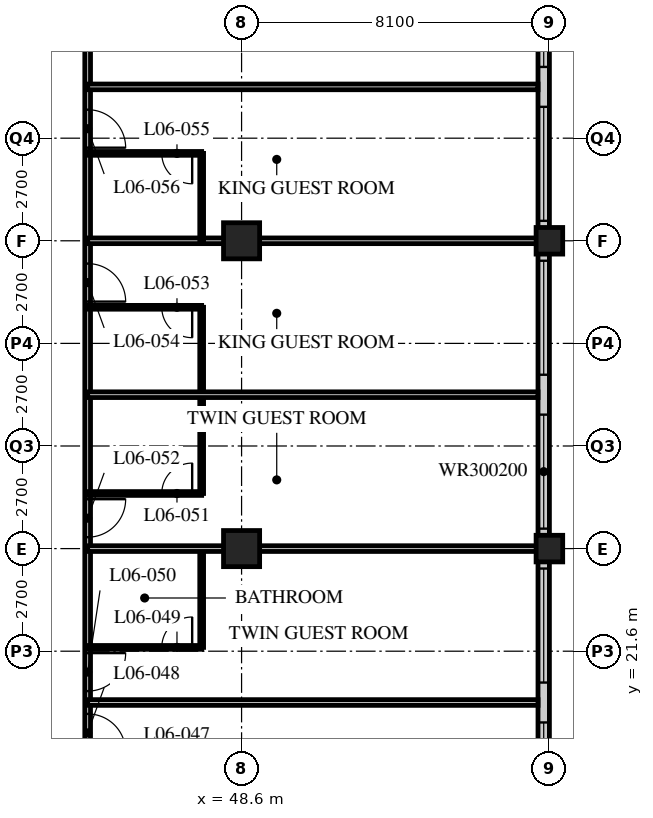
"""IFC4 building model, lengths in metres.
Left out: names, types, materials, properties, quantities, classifications, styles, units other than length and angle.
Written with IfcOpenShell. Run it as: python <this file> out.ifc"""

import sys

from ifc_helpers import new_model, si_unit, direction, frame, frame_2d, origin, origin_2d, place, context, subcontext, project, spatial, rectangle, hollow_rectangle, extrude, element, fill, save


model = new_model("IFC4")
c1 = context("Model", 3, precision=1e-05, world=origin(), true_north=direction((0.0, 1.0)))
c2 = subcontext(c1, "Body", "Model", "MODEL_VIEW")
j1 = project(units=[si_unit("LENGTHUNIT", "METRE"), si_unit("PLANEANGLEUNIT", "RADIAN")], contexts=[c1])
p1 = place(None, origin())
s1 = spatial("IfcSite", under=j1, at=p1, CompositionType="ELEMENT")
p2 = place(p1, origin())
s2 = spatial("IfcBuilding", under=s1, at=p2, CompositionType="ELEMENT")
p3 = place(p2, frame((0.0, 0.0, 33.0)))
s3 = spatial("IfcBuildingStorey", under=s2, at=p3, CompositionType="ELEMENT", Elevation=33.0)
for number, where, z_axis, x_axis in (
    (1, (48.6, 24.3, 0.0), (0.0, 0.0, 1.0), (1.0, 0.0, 0.0)),
    (2, (48.6, 32.4, 0.0), (0.0, 0.0, 1.0), (1.0, 0.0, 0.0)),
):
    element("IfcColumn", number, at=place(p3, frame(where, z_axis=z_axis, x_axis=x_axis)), inside=s3, PredefinedType="COLUMN", context=c2, shape_type="SweptSolid", body=[
        extrude(hollow_rectangle(XDim=0.95, YDim=0.95, WallThickness=0.095, at=origin_2d()), origin(), (0.0, 0.0, 1.0), 3.4),
    ])
for number, where, z_axis, x_axis in (
    (3, (56.7, 24.3, 0.0), (0.0, 0.0, 1.0), (1.0, 0.0, 0.0)),
    (4, (56.7, 32.4, 0.0), (0.0, 0.0, 1.0), (1.0, 0.0, 0.0)),
):
    element("IfcColumn", number, at=place(p3, frame(where, z_axis=z_axis, x_axis=x_axis)), inside=s3, PredefinedType="COLUMN", context=c2, shape_type="SweptSolid", body=[
        extrude(hollow_rectangle(XDim=0.7, YDim=0.7, WallThickness=0.06, at=origin_2d()), origin(), (0.0, 0.0, 1.0), 3.4),
    ])
p4 = place(p3, frame((56.55, 8.4, 0.0), z_axis=(0.0, 0.0, 1.0), x_axis=(0.0, 1.0, 0.0)))
e5 = element("IfcWall", 5, at=p4, inside=s3, PredefinedType="SOLIDWALL", context=c2, shape_type="SweptSolid", body=[
    extrude(rectangle(XDim=32.1, YDim=0.3, at=frame_2d((16.05, 0.0))), origin(), (0.0, 0.0, 1.0), 3.19),
])
p5 = place(p4, frame((0.225, 0.0, 0.9)))
e6 = element("IfcOpeningElement", 6, at=p5, cuts=e5, PredefinedType="OPENING", context=c2, shape_type="SweptSolid", body=[
    extrude(rectangle(XDim=3.0, YDim=2.0, at=frame_2d((1.5, 1.0))), frame((0.0, 0.16, 0.0), z_axis=(0.0, -1.0, 0.0), x_axis=(1.0, 0.0, 0.0)), (0.0, 0.0, 1.0), 0.32),
])
p6 = place(p4, frame((4.275, 0.0, 0.9)))
e7 = element("IfcOpeningElement", 7, at=p6, cuts=e5, PredefinedType="OPENING", context=c2, shape_type="SweptSolid", body=[
    extrude(rectangle(XDim=3.0, YDim=2.0, at=frame_2d((1.5, 1.0))), frame((0.0, 0.16, 0.0), z_axis=(0.0, -1.0, 0.0), x_axis=(1.0, 0.0, 0.0)), (0.0, 0.0, 1.0), 0.32),
])
p7 = place(p4, frame((8.325, 0.0, 0.9)))
e8 = element("IfcOpeningElement", 8, at=p7, cuts=e5, PredefinedType="OPENING", context=c2, shape_type="SweptSolid", body=[
    extrude(rectangle(XDim=3.0, YDim=2.0, at=frame_2d((1.5, 1.0))), frame((0.0, 0.16, 0.0), z_axis=(0.0, -1.0, 0.0), x_axis=(1.0, 0.0, 0.0)), (0.0, 0.0, 1.0), 0.32),
])
p8 = place(p4, frame((12.375, 0.0, 0.9)))
e9 = element("IfcOpeningElement", 9, at=p8, cuts=e5, PredefinedType="OPENING", context=c2, shape_type="SweptSolid", body=[
    extrude(rectangle(XDim=3.0, YDim=2.0, at=frame_2d((1.5, 1.0))), frame((0.0, 0.16, 0.0), z_axis=(0.0, -1.0, 0.0), x_axis=(1.0, 0.0, 0.0)), (0.0, 0.0, 1.0), 0.32),
])
p9 = place(p4, frame((16.425, 0.0, 0.9)))
e10 = element("IfcOpeningElement", 10, at=p9, cuts=e5, PredefinedType="OPENING", context=c2, shape_type="SweptSolid", body=[
    extrude(rectangle(XDim=3.0, YDim=2.0, at=frame_2d((1.5, 1.0))), frame((0.0, 0.16, 0.0), z_axis=(0.0, -1.0, 0.0), x_axis=(1.0, 0.0, 0.0)), (0.0, 0.0, 1.0), 0.32),
])
p10 = place(p4, frame((20.475, 0.0, 0.9)))
e11 = element("IfcOpeningElement", 11, at=p10, cuts=e5, PredefinedType="OPENING", context=c2, shape_type="SweptSolid", body=[
    extrude(rectangle(XDim=3.0, YDim=2.0, at=frame_2d((1.5, 1.0))), frame((0.0, 0.16, 0.0), z_axis=(0.0, -1.0, 0.0), x_axis=(1.0, 0.0, 0.0)), (0.0, 0.0, 1.0), 0.32),
])
p11 = place(p4, frame((24.525, 0.0, 0.9)))
e12 = element("IfcOpeningElement", 12, at=p11, cuts=e5, PredefinedType="OPENING", context=c2, shape_type="SweptSolid", body=[
    extrude(rectangle(XDim=3.0, YDim=2.0, at=frame_2d((1.5, 1.0))), frame((0.0, 0.16, 0.0), z_axis=(0.0, -1.0, 0.0), x_axis=(1.0, 0.0, 0.0)), (0.0, 0.0, 1.0), 0.32),
])
p12 = place(p4, frame((28.575, 0.0, 0.9)))
e13 = element("IfcOpeningElement", 13, at=p12, cuts=e5, PredefinedType="OPENING", context=c2, shape_type="SweptSolid", body=[
    extrude(rectangle(XDim=3.0, YDim=2.0, at=frame_2d((1.5, 1.0))), frame((0.0, 0.16, 0.0), z_axis=(0.0, -1.0, 0.0), x_axis=(1.0, 0.0, 0.0)), (0.0, 0.0, 1.0), 0.32),
])
p13 = place(p3, frame((44.55, 16.2, 0.0), z_axis=(0.0, 0.0, 1.0), x_axis=(0.0, 1.0, 0.0)))
e14 = element("IfcWall", 14, at=p13, inside=s3, PredefinedType="PARTITIONING", context=c2, shape_type="SweptSolid", body=[
    extrude(rectangle(XDim=26.1, YDim=0.15, at=frame_2d((13.05, 0.0))), origin(), (0.0, 0.0, 1.0), 3.19),
])
p14 = place(p13, frame((2.75, 0.0, 0.0)))
e15 = element("IfcOpeningElement", 15, at=p14, cuts=e14, PredefinedType="OPENING", context=c2, shape_type="SweptSolid", body=[
    extrude(rectangle(XDim=1.0, YDim=2.1, at=frame_2d((0.5, 1.05))), frame((0.0, 0.085, 0.0), z_axis=(0.0, -1.0, 0.0), x_axis=(1.0, 0.0, 0.0)), (0.0, 0.0, 1.0), 0.17),
])
p15 = place(p13, frame((4.35, 0.0, 0.0)))
e16 = element("IfcOpeningElement", 16, at=p15, cuts=e14, PredefinedType="OPENING", context=c2, shape_type="SweptSolid", body=[
    extrude(rectangle(XDim=1.0, YDim=2.1, at=frame_2d((0.5, 1.05))), frame((0.0, 0.085, 0.0), z_axis=(0.0, -1.0, 0.0), x_axis=(1.0, 0.0, 0.0)), (0.0, 0.0, 1.0), 0.17),
])
p16 = place(p13, frame((8.4, 0.0, 0.0)))
e17 = element("IfcOpeningElement", 17, at=p16, cuts=e14, PredefinedType="OPENING", context=c2, shape_type="SweptSolid", body=[
    extrude(rectangle(XDim=1.0, YDim=2.1, at=frame_2d((0.5, 1.05))), frame((0.0, 0.085, 0.0), z_axis=(0.0, -1.0, 0.0), x_axis=(1.0, 0.0, 0.0)), (0.0, 0.0, 1.0), 0.17),
])
p17 = place(p13, frame((14.6, 0.0, 0.0)))
e18 = element("IfcOpeningElement", 18, at=p17, cuts=e14, PredefinedType="OPENING", context=c2, shape_type="SweptSolid", body=[
    extrude(rectangle(XDim=1.0, YDim=2.1, at=frame_2d((0.5, 1.05))), frame((0.0, 0.085, 0.0), z_axis=(0.0, -1.0, 0.0), x_axis=(1.0, 0.0, 0.0)), (0.0, 0.0, 1.0), 0.17),
])
p18 = place(p13, frame((18.65, 0.0, 0.0)))
e19 = element("IfcOpeningElement", 19, at=p18, cuts=e14, PredefinedType="OPENING", context=c2, shape_type="SweptSolid", body=[
    extrude(rectangle(XDim=1.0, YDim=2.1, at=frame_2d((0.5, 1.05))), frame((0.0, 0.085, 0.0), z_axis=(0.0, -1.0, 0.0), x_axis=(1.0, 0.0, 0.0)), (0.0, 0.0, 1.0), 0.17),
])
p19 = place(p13, frame((22.65, 0.0, 0.0)))
e20 = element("IfcOpeningElement", 20, at=p19, cuts=e14, PredefinedType="OPENING", context=c2, shape_type="SweptSolid", body=[
    extrude(rectangle(XDim=1.0, YDim=2.1, at=frame_2d((0.5, 1.05))), frame((0.0, 0.085, 0.0), z_axis=(0.0, -1.0, 0.0), x_axis=(1.0, 0.0, 0.0)), (0.0, 0.0, 1.0), 0.17),
])
p20 = place(p3, frame((44.55, 20.25, 0.0), z_axis=(0.0, 0.0, 1.0), x_axis=(1.0, 0.0, 0.0)))
e21 = element("IfcWall", 21, at=p20, inside=s3, PredefinedType="PARTITIONING", context=c2, shape_type="SweptSolid", body=[
    extrude(rectangle(XDim=11.85, YDim=0.15, at=frame_2d((5.925, 0.0))), origin(), (0.0, 0.0, 1.0), 3.19),
])
p21 = place(p3, frame((47.55, 21.7, 0.0), z_axis=(0.0, 0.0, 1.0), x_axis=(0.0, 1.0, 0.0)))
e22 = element("IfcWall", 22, at=p21, inside=s3, PredefinedType="PARTITIONING", context=c2, shape_type="SweptSolid", body=[
    extrude(rectangle(XDim=2.6, YDim=0.1, at=frame_2d((1.3, 0.0))), origin(), (0.0, 0.0, 1.0), 3.19),
])
p22 = place(p3, frame((44.55, 21.7, 0.0), z_axis=(0.0, 0.0, 1.0), x_axis=(1.0, 0.0, 0.0)))
e23 = element("IfcWall", 23, at=p22, inside=s3, PredefinedType="PARTITIONING", context=c2, shape_type="SweptSolid", body=[
    extrude(rectangle(XDim=3.0, YDim=0.1, at=frame_2d((1.5, 0.0))), origin(), (0.0, 0.0, 1.0), 3.19),
])
p23 = place(p22, frame((1.95, 0.0, 0.0)))
e24 = element("IfcOpeningElement", 24, at=p23, cuts=e23, PredefinedType="OPENING", context=c2, shape_type="SweptSolid", body=[
    extrude(rectangle(XDim=0.8, YDim=2.1, at=frame_2d((0.4, 1.05))), frame((0.0, 0.06, 0.0), z_axis=(0.0, -1.0, 0.0), x_axis=(1.0, 0.0, 0.0)), (0.0, 0.0, 1.0), 0.12),
])
p24 = place(p3, frame((44.55, 24.3, 0.0), z_axis=(0.0, 0.0, 1.0), x_axis=(1.0, 0.0, 0.0)))
e25 = element("IfcWall", 25, at=p24, inside=s3, PredefinedType="PARTITIONING", context=c2, shape_type="SweptSolid", body=[
    extrude(rectangle(XDim=11.85, YDim=0.15, at=frame_2d((5.925, 0.0))), origin(), (0.0, 0.0, 1.0), 2.578),
])
p25 = place(p3, frame((47.55, 25.75, 0.0), z_axis=(0.0, 0.0, 1.0), x_axis=(0.0, 1.0, 0.0)))
e26 = element("IfcWall", 26, at=p25, inside=s3, PredefinedType="PARTITIONING", context=c2, shape_type="SweptSolid", body=[
    extrude(rectangle(XDim=4.9, YDim=0.1, at=frame_2d((2.45, 0.0))), origin(), (0.0, 0.0, 1.0), 3.19),
])
p26 = place(p3, frame((44.55, 25.75, 0.0), z_axis=(0.0, 0.0, 1.0), x_axis=(1.0, 0.0, 0.0)))
e27 = element("IfcWall", 27, at=p26, inside=s3, PredefinedType="PARTITIONING", context=c2, shape_type="SweptSolid", body=[
    extrude(rectangle(XDim=3.0, YDim=0.1, at=frame_2d((1.5, 0.0))), origin(), (0.0, 0.0, 1.0), 3.19),
])
p27 = place(p26, frame((1.95, 0.0, 0.0)))
e28 = element("IfcOpeningElement", 28, at=p27, cuts=e27, PredefinedType="OPENING", context=c2, shape_type="SweptSolid", body=[
    extrude(rectangle(XDim=0.8, YDim=2.1, at=frame_2d((0.4, 1.05))), frame((0.0, 0.06, 0.0), z_axis=(0.0, -1.0, 0.0), x_axis=(1.0, 0.0, 0.0)), (0.0, 0.0, 1.0), 0.12),
])
p28 = place(p3, frame((44.55, 28.35, 0.0), z_axis=(0.0, 0.0, 1.0), x_axis=(1.0, 0.0, 0.0)))
e29 = element("IfcWall", 29, at=p28, inside=s3, PredefinedType="PARTITIONING", context=c2, shape_type="SweptSolid", body=[
    extrude(rectangle(XDim=11.85, YDim=0.15, at=frame_2d((5.925, 0.0))), origin(), (0.0, 0.0, 1.0), 3.19),
])
p29 = place(p3, frame((44.55, 30.65, 0.0), z_axis=(0.0, 0.0, 1.0), x_axis=(1.0, 0.0, 0.0)))
e30 = element("IfcWall", 30, at=p29, inside=s3, PredefinedType="PARTITIONING", context=c2, shape_type="SweptSolid", body=[
    extrude(rectangle(XDim=3.0, YDim=0.1, at=frame_2d((1.5, 0.0))), origin(), (0.0, 0.0, 1.0), 3.19),
])
p30 = place(p29, frame((1.95, 0.0, 0.0)))
e31 = element("IfcOpeningElement", 31, at=p30, cuts=e30, PredefinedType="OPENING", context=c2, shape_type="SweptSolid", body=[
    extrude(rectangle(XDim=0.8, YDim=2.1, at=frame_2d((0.4, 1.05))), frame((0.0, 0.06, 0.0), z_axis=(0.0, -1.0, 0.0), x_axis=(1.0, 0.0, 0.0)), (0.0, 0.0, 1.0), 0.12),
])
p31 = place(p3, frame((44.55, 32.4, 0.0), z_axis=(0.0, 0.0, 1.0), x_axis=(1.0, 0.0, 0.0)))
e32 = element("IfcWall", 32, at=p31, inside=s3, PredefinedType="PARTITIONING", context=c2, shape_type="SweptSolid", body=[
    extrude(rectangle(XDim=11.85, YDim=0.15, at=frame_2d((5.925, 0.0))), origin(), (0.0, 0.0, 1.0), 2.578),
])
p32 = place(p3, frame((47.55, 32.4, 0.0), z_axis=(0.0, 0.0, 1.0), x_axis=(0.0, 1.0, 0.0)))
e33 = element("IfcWall", 33, at=p32, inside=s3, PredefinedType="PARTITIONING", context=c2, shape_type="SweptSolid", body=[
    extrude(rectangle(XDim=2.3, YDim=0.1, at=frame_2d((1.15, 0.0))), origin(), (0.0, 0.0, 1.0), 3.19),
])
p33 = place(p3, frame((44.55, 34.7, 0.0), z_axis=(0.0, 0.0, 1.0), x_axis=(1.0, 0.0, 0.0)))
e34 = element("IfcWall", 34, at=p33, inside=s3, PredefinedType="PARTITIONING", context=c2, shape_type="SweptSolid", body=[
    extrude(rectangle(XDim=3.0, YDim=0.1, at=frame_2d((1.5, 0.0))), origin(), (0.0, 0.0, 1.0), 3.19),
])
p34 = place(p33, frame((1.95, 0.0, 0.0)))
e35 = element("IfcOpeningElement", 35, at=p34, cuts=e34, PredefinedType="OPENING", context=c2, shape_type="SweptSolid", body=[
    extrude(rectangle(XDim=0.8, YDim=2.1, at=frame_2d((0.4, 1.05))), frame((0.0, 0.06, 0.0), z_axis=(0.0, -1.0, 0.0), x_axis=(1.0, 0.0, 0.0)), (0.0, 0.0, 1.0), 0.12),
])
p35 = place(p3, frame((44.55, 36.45, 0.0), z_axis=(0.0, 0.0, 1.0), x_axis=(1.0, 0.0, 0.0)))
e36 = element("IfcWall", 36, at=p35, inside=s3, PredefinedType="PARTITIONING", context=c2, shape_type="SweptSolid", body=[
    extrude(rectangle(XDim=11.85, YDim=0.15, at=frame_2d((5.925, 0.0))), origin(), (0.0, 0.0, 1.0), 3.19),
])
p36 = place(p7, origin())
e37 = element("IfcWindow", 37, at=p36, inside=s3, PartitioningType="SINGLE_PANEL", PredefinedType="WINDOW", context=c2, shape_type="SweptSolid", body=[
    extrude(rectangle(XDim=3.0, YDim=2.0, at=frame_2d((1.5, 1.0))), frame((0.0, 0.03, 0.0), z_axis=(0.0, -1.0, 0.0), x_axis=(1.0, 0.0, 0.0)), (0.0, 0.0, 1.0), 0.06),
])
fill(e8, e37)
p37 = place(p8, origin())
e38 = element("IfcWindow", 38, at=p37, inside=s3, PartitioningType="SINGLE_PANEL", PredefinedType="WINDOW", context=c2, shape_type="SweptSolid", body=[
    extrude(rectangle(XDim=3.0, YDim=2.0, at=frame_2d((1.5, 1.0))), frame((0.0, 0.03, 0.0), z_axis=(0.0, -1.0, 0.0), x_axis=(1.0, 0.0, 0.0)), (0.0, 0.0, 1.0), 0.06),
])
fill(e9, e38)
p38 = place(p9, origin())
e39 = element("IfcWindow", 39, at=p38, inside=s3, PartitioningType="SINGLE_PANEL", PredefinedType="WINDOW", context=c2, shape_type="SweptSolid", body=[
    extrude(rectangle(XDim=3.0, YDim=2.0, at=frame_2d((1.5, 1.0))), frame((0.0, 0.03, 0.0), z_axis=(0.0, -1.0, 0.0), x_axis=(1.0, 0.0, 0.0)), (0.0, 0.0, 1.0), 0.06),
])
fill(e10, e39)
p39 = place(p10, origin())
e40 = element("IfcWindow", 40, at=p39, inside=s3, PartitioningType="SINGLE_PANEL", PredefinedType="WINDOW", context=c2, shape_type="SweptSolid", body=[
    extrude(rectangle(XDim=3.0, YDim=2.0, at=frame_2d((1.5, 1.0))), frame((0.0, 0.03, 0.0), z_axis=(0.0, -1.0, 0.0), x_axis=(1.0, 0.0, 0.0)), (0.0, 0.0, 1.0), 0.06),
])
fill(e11, e40)
p40 = place(p11, origin())
e41 = element("IfcWindow", 41, at=p40, inside=s3, PartitioningType="SINGLE_PANEL", PredefinedType="WINDOW", context=c2, shape_type="SweptSolid", body=[
    extrude(rectangle(XDim=3.0, YDim=2.0, at=frame_2d((1.5, 1.0))), frame((0.0, 0.03, 0.0), z_axis=(0.0, -1.0, 0.0), x_axis=(1.0, 0.0, 0.0)), (0.0, 0.0, 1.0), 0.06),
])
fill(e12, e41)
p41 = place(p12, origin())
e42 = element("IfcWindow", 42, at=p41, inside=s3, PartitioningType="SINGLE_PANEL", PredefinedType="WINDOW", context=c2, shape_type="SweptSolid", body=[
    extrude(rectangle(XDim=3.0, YDim=2.0, at=frame_2d((1.5, 1.0))), frame((0.0, 0.03, 0.0), z_axis=(0.0, -1.0, 0.0), x_axis=(1.0, 0.0, 0.0)), (0.0, 0.0, 1.0), 0.06),
])
fill(e13, e42)
p42 = place(p14, origin())
e43 = element("IfcDoor", 43, at=p42, inside=s3, OperationType="SINGLE_SWING_RIGHT", PredefinedType="DOOR", context=c2, shape_type="SweptSolid", body=[
    extrude(rectangle(XDim=1.0, YDim=2.1, at=frame_2d((0.5, 1.05))), frame((0.0, 0.025, 0.0), z_axis=(0.0, -1.0, 0.0), x_axis=(1.0, 0.0, 0.0)), (0.0, 0.0, 1.0), 0.05),
])
fill(e15, e43)
p43 = place(p23, origin())
e44 = element("IfcDoor", 44, at=p43, inside=s3, OperationType="SINGLE_SWING_RIGHT", PredefinedType="DOOR", context=c2, shape_type="SweptSolid", body=[
    extrude(rectangle(XDim=0.8, YDim=2.1, at=frame_2d((0.4, 1.05))), frame((0.0, 0.025, 0.0), z_axis=(0.0, -1.0, 0.0), x_axis=(1.0, 0.0, 0.0)), (0.0, 0.0, 1.0), 0.05),
])
fill(e24, e44)
p44 = place(p15, origin())
e45 = element("IfcDoor", 45, at=p44, inside=s3, OperationType="SINGLE_SWING_LEFT", PredefinedType="DOOR", context=c2, shape_type="SweptSolid", body=[
    extrude(rectangle(XDim=1.0, YDim=2.1, at=frame_2d((0.5, 1.05))), frame((0.0, 0.025, 0.0), z_axis=(0.0, -1.0, 0.0), x_axis=(1.0, 0.0, 0.0)), (0.0, 0.0, 1.0), 0.05),
])
fill(e16, e45)
p45 = place(p27, origin())
e46 = element("IfcDoor", 46, at=p45, inside=s3, OperationType="SINGLE_SWING_RIGHT", PredefinedType="DOOR", context=c2, shape_type="SweptSolid", body=[
    extrude(rectangle(XDim=0.8, YDim=2.1, at=frame_2d((0.4, 1.05))), frame((0.0, 0.025, 0.0), z_axis=(0.0, -1.0, 0.0), x_axis=(1.0, 0.0, 0.0)), (0.0, 0.0, 1.0), 0.05),
])
fill(e28, e46)
p46 = place(p16, origin())
e47 = element("IfcDoor", 47, at=p46, inside=s3, OperationType="SINGLE_SWING_LEFT", PredefinedType="DOOR", context=c2, shape_type="SweptSolid", body=[
    extrude(rectangle(XDim=1.0, YDim=2.1, at=frame_2d((0.5, 1.05))), frame((0.0, 0.025, 0.0), z_axis=(0.0, -1.0, 0.0), x_axis=(1.0, 0.0, 0.0)), (0.0, 0.0, 1.0), 0.05),
])
fill(e17, e47)
p47 = place(p30, origin())
e48 = element("IfcDoor", 48, at=p47, inside=s3, OperationType="SINGLE_SWING_LEFT", PredefinedType="DOOR", context=c2, shape_type="SweptSolid", body=[
    extrude(rectangle(XDim=0.8, YDim=2.1, at=frame_2d((0.4, 1.05))), frame((0.0, 0.025, 0.0), z_axis=(0.0, -1.0, 0.0), x_axis=(1.0, 0.0, 0.0)), (0.0, 0.0, 1.0), 0.05),
])
fill(e31, e48)
p48 = place(p17, origin())
e49 = element("IfcDoor", 49, at=p48, inside=s3, OperationType="SINGLE_SWING_RIGHT", PredefinedType="DOOR", context=c2, shape_type="SweptSolid", body=[
    extrude(rectangle(XDim=1.0, YDim=2.1, at=frame_2d((0.5, 1.05))), frame((0.0, 0.025, 0.0), z_axis=(0.0, -1.0, 0.0), x_axis=(1.0, 0.0, 0.0)), (0.0, 0.0, 1.0), 0.05),
])
fill(e18, e49)
p49 = place(p34, origin())
e50 = element("IfcDoor", 50, at=p49, inside=s3, OperationType="SINGLE_SWING_LEFT", PredefinedType="DOOR", context=c2, shape_type="SweptSolid", body=[
    extrude(rectangle(XDim=0.8, YDim=2.1, at=frame_2d((0.4, 1.05))), frame((0.0, 0.025, 0.0), z_axis=(0.0, -1.0, 0.0), x_axis=(1.0, 0.0, 0.0)), (0.0, 0.0, 1.0), 0.05),
])
fill(e35, e50)
p50 = place(p18, origin())
e51 = element("IfcDoor", 51, at=p50, inside=s3, OperationType="SINGLE_SWING_RIGHT", PredefinedType="DOOR", context=c2, shape_type="SweptSolid", body=[
    extrude(rectangle(XDim=1.0, YDim=2.1, at=frame_2d((0.5, 1.05))), frame((0.0, 0.025, 0.0), z_axis=(0.0, -1.0, 0.0), x_axis=(1.0, 0.0, 0.0)), (0.0, 0.0, 1.0), 0.05),
])
fill(e19, e51)
save(model, sys.argv[1])
